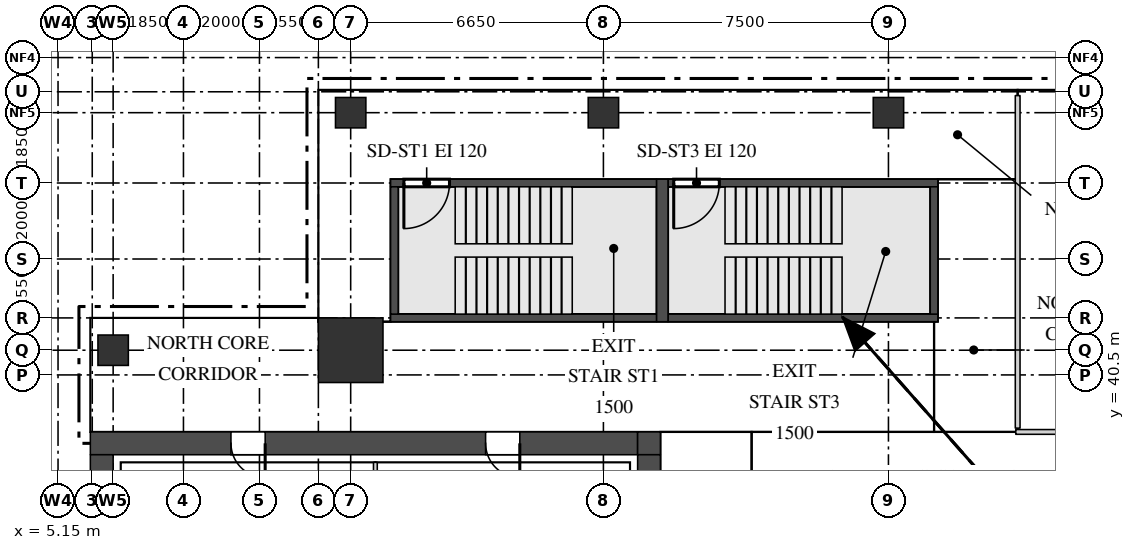
"""IFC4 building model, lengths in metres.
Left out: names, types, materials, properties, quantities, classifications, styles, units other than length and angle.
Written with IfcOpenShell. Run it as: python <this file> out.ifc"""

import sys

from ifc_helpers import new_model, si_unit, direction, frame, frame_2d, origin, origin_2d, place, context, subcontext, project, spatial, rectangle, extrude, source, transform, mapped, element, fill, save


model = new_model("IFC4")
c1 = context("Model", 3, precision=1e-05, world=origin(), true_north=direction((0.0, 1.0)))
c2 = subcontext(c1, "Body", "Model", "MODEL_VIEW")
j1 = project(units=[si_unit("LENGTHUNIT", "METRE"), si_unit("PLANEANGLEUNIT", "RADIAN")], contexts=[c1])
p1 = place(None, origin())
s1 = spatial("IfcSite", under=j1, at=p1, CompositionType="ELEMENT")
p2 = place(p1, origin())
s2 = spatial("IfcBuilding", under=s1, at=p2, CompositionType="ELEMENT")
p3 = place(p2, frame((0.0, 0.0, 306.2)))
s3 = spatial("IfcBuildingStorey", under=s2, at=p3, CompositionType="ELEMENT", Elevation=306.2)
m1 = source(origin(), c2, "Body", "SweptSolid", [
    extrude(rectangle(XDim=14.4, YDim=0.6, at=frame_2d((7.2, 0.0))), origin(), (0.0, 0.0, 1.0), 3.75),
])
p4 = place(p3, frame((6.0, 38.7, 0.0), z_axis=(0.0, 0.0, 1.0), x_axis=(1.0, 0.0, 0.0)))
e1 = element("IfcWall", 1, at=p4, inside=s3, PredefinedType="SHEAR", context=c2, shape_type="MappedRepresentation", body=[
    mapped(m1, transform((0.0, 0.0, 0.0))),
])
m2 = source(origin(), c2, "Body", "SweptSolid", [
    extrude(rectangle(XDim=0.9, YDim=2.1, at=frame_2d((0.45, 1.05))), frame((0.0, 0.31, 0.0), z_axis=(0.0, -1.0, 0.0), x_axis=(1.0, 0.0, 0.0)), (0.0, 0.0, 1.0), 0.62),
])
p5 = place(p4, frame((3.7, 0.0, 0.0)))
e2 = element("IfcOpeningElement", 2, at=p5, cuts=e1, PredefinedType="OPENING", context=c2, shape_type="MappedRepresentation", body=[
    mapped(m2, transform((0.0, 0.0, 0.0))),
])
p6 = place(p4, frame((10.4, 0.0, 0.0)))
e3 = element("IfcOpeningElement", 3, at=p6, cuts=e1, PredefinedType="OPENING", context=c2, shape_type="MappedRepresentation", body=[
    mapped(m2, transform((0.0, 0.0, 0.0))),
])
m3 = source(origin(), c2, "Body", "SweptSolid", [
    extrude(rectangle(XDim=0.6, YDim=0.6, at=frame_2d((0.3, 0.0))), origin(), (0.0, 0.0, 1.0), 3.75),
])
p7 = place(p3, frame((20.4, 38.7, 0.0), z_axis=(0.0, 0.0, 1.0), x_axis=(1.0, 0.0, 0.0)))
e4 = element("IfcWall", 4, at=p7, inside=s3, PredefinedType="SHEAR", context=c2, shape_type="MappedRepresentation", body=[
    mapped(m3, transform((0.0, 0.0, 0.0))),
])
m4 = source(origin(), c2, "Body", "SweptSolid", [
    extrude(rectangle(XDim=22.8, YDim=0.6, at=frame_2d((11.4, 0.0))), origin(), (0.0, 0.0, 1.0), 3.75),
])
p8 = place(p3, frame((20.7, 15.6, 0.0), z_axis=(0.0, 0.0, 1.0), x_axis=(0.0, 1.0, 0.0)))
e5 = element("IfcWall", 5, at=p8, inside=s3, PredefinedType="SHEAR", context=c2, shape_type="MappedRepresentation", body=[
    mapped(m4, transform((0.0, 0.0, 0.0))),
])
m5 = source(origin(), c2, "Body", "SweptSolid", [
    extrude(rectangle(XDim=1.8, YDim=2.1, at=frame_2d((0.9, 1.05))), frame((0.0, 0.31, 0.0), z_axis=(0.0, -1.0, 0.0), x_axis=(1.0, 0.0, 0.0)), (0.0, 0.0, 1.0), 0.62),
])
p9 = place(p8, frame((10.9, 0.0, 0.0)))
e6 = element("IfcOpeningElement", 6, at=p9, cuts=e5, PredefinedType="OPENING", context=c2, shape_type="MappedRepresentation", body=[
    mapped(m5, transform((0.0, 0.0, 0.0))),
])
p10 = place(p8, frame((0.55, 0.0, 0.0)))
e7 = element("IfcOpeningElement", 7, at=p10, cuts=e5, PredefinedType="OPENING", context=c2, shape_type="MappedRepresentation", body=[
    mapped(m2, transform((0.0, 0.0, 0.0))),
])
p11 = place(p8, frame((3.0, 0.0, 0.0)))
e8 = element("IfcOpeningElement", 8, at=p11, cuts=e5, PredefinedType="OPENING", context=c2, shape_type="MappedRepresentation", body=[
    mapped(m2, transform((0.0, 0.0, 0.0))),
])
p12 = place(p8, frame((5.75, 0.0, 0.0)))
e9 = element("IfcOpeningElement", 9, at=p12, cuts=e5, PredefinedType="OPENING", context=c2, shape_type="MappedRepresentation", body=[
    mapped(m2, transform((0.0, 0.0, 0.0))),
])
p13 = place(p3, frame((6.3, 15.6, 0.0), z_axis=(0.0, 0.0, 1.0), x_axis=(0.0, 1.0, 0.0)))
e10 = element("IfcWall", 10, at=p13, inside=s3, PredefinedType="SHEAR", context=c2, shape_type="MappedRepresentation", body=[
    mapped(m4, transform((0.0, 0.0, 0.0))),
])
m6 = source(origin(), c2, "Body", "SweptSolid", [
    extrude(rectangle(XDim=7.0, YDim=0.2, at=frame_2d((3.5, 0.0))), origin(), (0.0, 0.0, 1.0), 3.75),
])
p14 = place(p3, frame((13.9, 45.55, 0.0), z_axis=(0.0, 0.0, 1.0), x_axis=(1.0, 0.0, 0.0)))
e11 = element("IfcWall", 11, at=p14, inside=s3, PredefinedType="SHEAR", context=c2, shape_type="MappedRepresentation", body=[
    mapped(m6, transform((0.0, 0.0, 0.0))),
])
m7 = source(origin(), c2, "Body", "SweptSolid", [
    extrude(rectangle(XDim=1.2, YDim=2.1, at=frame_2d((0.6, 1.05))), frame((0.0, 0.11, 0.0), z_axis=(0.0, -1.0, 0.0), x_axis=(1.0, 0.0, 0.0)), (0.0, 0.0, 1.0), 0.22),
])
p15 = place(p14, frame((0.35, 0.0, 0.0)))
e12 = element("IfcOpeningElement", 12, at=p15, cuts=e11, PredefinedType="OPENING", context=c2, shape_type="MappedRepresentation", body=[
    mapped(m7, transform((0.0, 0.0, 0.0))),
])
p16 = place(p3, frame((13.9, 42.0, 0.0), z_axis=(0.0, 0.0, 1.0), x_axis=(1.0, 0.0, 0.0)))
e13 = element("IfcWall", 13, at=p16, inside=s3, PredefinedType="SHEAR", context=c2, shape_type="MappedRepresentation", body=[
    mapped(m6, transform((0.0, 0.0, 0.0))),
])
m8 = source(origin(), c2, "Body", "SweptSolid", [
    extrude(rectangle(XDim=7.1, YDim=0.2, at=frame_2d((3.55, 0.0))), origin(), (0.0, 0.0, 1.0), 3.75),
])
p17 = place(p3, frame((21.2, 45.55, 0.0), z_axis=(0.0, 0.0, 1.0), x_axis=(1.0, 0.0, 0.0)))
e14 = element("IfcWall", 14, at=p17, inside=s3, PredefinedType="SHEAR", context=c2, shape_type="MappedRepresentation", body=[
    mapped(m8, transform((0.0, 0.0, 0.0))),
])
p18 = place(p17, frame((0.15, 0.0, 0.0)))
e15 = element("IfcOpeningElement", 15, at=p18, cuts=e14, PredefinedType="OPENING", context=c2, shape_type="MappedRepresentation", body=[
    mapped(m7, transform((0.0, 0.0, 0.0))),
])
p19 = place(p3, frame((21.2, 42.0, 0.0), z_axis=(0.0, 0.0, 1.0), x_axis=(1.0, 0.0, 0.0)))
e16 = element("IfcWall", 16, at=p19, inside=s3, PredefinedType="SHEAR", context=c2, shape_type="MappedRepresentation", body=[
    mapped(m8, transform((0.0, 0.0, 0.0))),
])
m9 = source(origin(), c2, "Body", "SweptSolid", [
    extrude(rectangle(XDim=3.75, YDim=0.3, at=frame_2d((1.875, 0.0))), origin(), (0.0, 0.0, 1.0), 3.75),
])
p20 = place(p3, frame((21.05, 41.9, 0.0), z_axis=(0.0, 0.0, 1.0), x_axis=(0.0, 1.0, 0.0)))
e17 = element("IfcWall", 17, at=p20, inside=s3, PredefinedType="SHEAR", context=c2, shape_type="MappedRepresentation", body=[
    mapped(m9, transform((0.0, 0.0, 0.0))),
])
m10 = source(origin(), c2, "Body", "SweptSolid", [
    extrude(rectangle(XDim=3.35, YDim=0.2, at=frame_2d((1.675, 0.0))), origin(), (0.0, 0.0, 1.0), 3.75),
])
for number, where, z_axis, x_axis in (
    (18, (14.0, 42.1, 0.0), (0.0, 0.0, 1.0), (0.0, 1.0, 0.0)),
    (19, (28.2, 42.1, 0.0), (0.0, 0.0, 1.0), (0.0, 1.0, 0.0)),
):
    element("IfcWall", number, at=place(p3, frame(where, z_axis=z_axis, x_axis=x_axis)), inside=s3, PredefinedType="SHEAR", context=c2, shape_type="MappedRepresentation", body=[
        mapped(m10, transform((0.0, 0.0, 0.0))),
    ])
m11 = source(origin(), c2, "Body", "SweptSolid", [
    extrude(rectangle(XDim=1.7, YDim=1.7, at=origin_2d()), origin(), (0.0, 0.0, 1.0), 3.75),
])
p21 = place(p3, frame((12.85, 41.15, 0.0), z_axis=(0.0, 0.0, 1.0), x_axis=(1.0, 0.0, 0.0)))
e20 = element("IfcColumn", 20, at=p21, inside=s3, PredefinedType="COLUMN", context=c2, shape_type="MappedRepresentation", body=[
    mapped(m11, transform((0.0, 0.0, 0.0))),
])
m12 = source(origin(), c2, "Body", "SweptSolid", [
    extrude(rectangle(XDim=0.8, YDim=0.8, at=origin_2d()), origin(), (0.0, 0.0, 1.0), 3.75),
])
for number, where, z_axis, x_axis in (
    (21, (12.85, 47.4, 0.0), (0.0, 0.0, 1.0), (1.0, 0.0, 0.0)),
    (22, (19.5, 47.4, 0.0), (0.0, 0.0, 1.0), (1.0, 0.0, 0.0)),
    (23, (27.0, 47.4, 0.0), (0.0, 0.0, 1.0), (1.0, 0.0, 0.0)),
    (24, (6.6, 41.15, 0.0), (0.0, 0.0, 1.0), (1.0, 0.0, 0.0)),
):
    element("IfcColumn", number, at=place(p3, frame(where, z_axis=z_axis, x_axis=x_axis)), inside=s3, PredefinedType="COLUMN", context=c2, shape_type="MappedRepresentation", body=[
        mapped(m12, transform((0.0, 0.0, 0.0))),
    ])
m13 = source(origin(), c2, "Body", "SweptSolid", [
    extrude(rectangle(XDim=6.0, YDim=0.1, at=frame_2d((3.0, 0.0))), origin(), (0.0, 0.0, 1.0), 3.8),
])
p22 = place(p3, frame((13.5, 32.2, 0.0), z_axis=(0.0, 0.0, 1.0), x_axis=(0.0, 1.0, 0.0)))
e25 = element("IfcWall", 25, at=p22, inside=s3, PredefinedType="PARTITIONING", context=c2, shape_type="MappedRepresentation", body=[
    mapped(m13, transform((0.0, 0.0, 0.0))),
])
m14 = source(origin(), c2, "Body", "SweptSolid", [
    extrude(rectangle(XDim=12.1, YDim=0.125, at=frame_2d((6.05, 0.0))), origin(), (0.0, 0.0, 1.0), 3.8),
])
p23 = place(p3, frame((30.35, 39.0, 0.0), z_axis=(0.0, 0.0, 1.0), x_axis=(1.0, 0.0, 0.0)))
e26 = element("IfcWall", 26, at=p23, inside=s3, PredefinedType="PARTITIONING", context=c2, shape_type="MappedRepresentation", body=[
    mapped(m14, transform((0.0, 0.0, 0.0))),
])
m15 = source(origin(), c2, "Body", "SweptSolid", [
    extrude(rectangle(XDim=1.2, YDim=2.1, at=frame_2d((0.6, 1.05))), frame((0.0, 0.073, 0.0), z_axis=(0.0, -1.0, 0.0), x_axis=(1.0, 0.0, 0.0)), (0.0, 0.0, 1.0), 0.145),
])
p24 = place(p23, frame((5.25, 0.0, 0.0)))
e27 = element("IfcOpeningElement", 27, at=p24, cuts=e26, PredefinedType="OPENING", context=c2, shape_type="MappedRepresentation", body=[
    mapped(m15, transform((0.0, 0.0, 0.0))),
])
m16 = source(origin(), c2, "Body", "SweptSolid", [
    extrude(rectangle(XDim=8.75, YDim=0.125, at=frame_2d((4.375, 0.0))), origin(), (0.0, 0.0, 1.0), 3.8),
])
p25 = place(p3, frame((30.4, 39.1, 0.0), z_axis=(0.0, 0.0, 1.0), x_axis=(0.0, 1.0, 0.0)))
e28 = element("IfcWall", 28, at=p25, inside=s3, PredefinedType="PARTITIONING", context=c2, shape_type="MappedRepresentation", body=[
    mapped(m16, transform((0.0, 0.0, 0.0))),
])
m17 = source(origin(), c2, "Body", "SweptSolid", [
    extrude(rectangle(XDim=0.9, YDim=2.1, at=frame_2d((0.45, 1.05))), frame((0.0, 0.25, 0.0), z_axis=(0.0, -1.0, 0.0), x_axis=(1.0, 0.0, 0.0)), (0.0, 0.0, 1.0), 0.5),
])
p26 = place(p5, origin())
e29 = element("IfcDoor", 29, at=p26, inside=s3, OperationType="SINGLE_SWING_RIGHT", PredefinedType="DOOR", context=c2, shape_type="MappedRepresentation", body=[
    mapped(m17, transform((0.0, 0.0, 0.0))),
])
fill(e2, e29)
p27 = place(p6, origin())
e30 = element("IfcDoor", 30, at=p27, inside=s3, OperationType="SINGLE_SWING_RIGHT", PredefinedType="DOOR", context=c2, shape_type="MappedRepresentation", body=[
    mapped(m17, transform((0.0, 0.0, 0.0))),
])
fill(e3, e30)
m18 = source(origin(), c2, "Body", "SweptSolid", [
    extrude(rectangle(XDim=1.2, YDim=2.1, at=frame_2d((0.6, 1.05))), frame((0.0, 0.025, 0.0), z_axis=(0.0, -1.0, 0.0), x_axis=(1.0, 0.0, 0.0)), (0.0, 0.0, 1.0), 0.05),
])
p28 = place(p15, origin())
e31 = element("IfcDoor", 31, at=p28, inside=s3, OperationType="SINGLE_SWING_LEFT", PredefinedType="DOOR", context=c2, shape_type="MappedRepresentation", body=[
    mapped(m18, transform((0.0, 0.0, 0.0))),
])
fill(e12, e31)
p29 = place(p18, origin())
e32 = element("IfcDoor", 32, at=p29, inside=s3, OperationType="SINGLE_SWING_LEFT", PredefinedType="DOOR", context=c2, shape_type="MappedRepresentation", body=[
    mapped(m18, transform((0.0, 0.0, 0.0))),
])
fill(e15, e32)
save(model, sys.argv[1])
